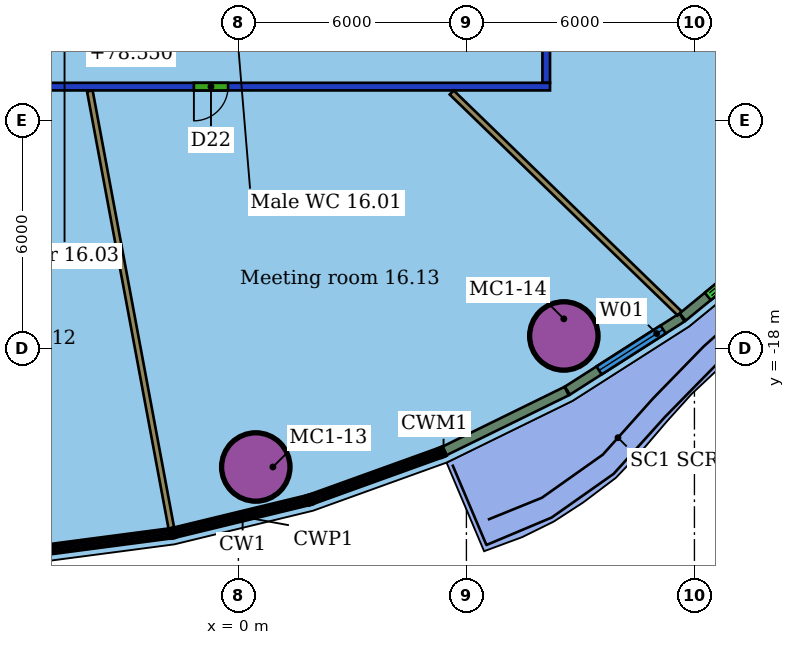
"""IFC4 building model, lengths in metres.
Left out: names, types, materials, properties, quantities, classifications, styles, units other than length and angle.
Written with IfcOpenShell. Run it as: python <this file> out.ifc"""

import sys

from ifc_helpers import new_model, si_unit, direction, frame, frame_2d, origin, origin_2d, place, context, subcontext, project, spatial, rectangle, hollow_circle, extrude, element, fill, save


model = new_model("IFC4")
c1 = context("Model", 3, precision=1e-05, world=origin(), true_north=direction((0.0, 1.0)))
c2 = subcontext(c1, "Body", "Model", "MODEL_VIEW")
j1 = project(units=[si_unit("LENGTHUNIT", "METRE"), si_unit("PLANEANGLEUNIT", "RADIAN")], contexts=[c1])
p1 = place(None, origin())
s1 = spatial("IfcSite", under=j1, at=p1, CompositionType="ELEMENT")
p2 = place(p1, origin())
s2 = spatial("IfcBuilding", under=s1, at=p2, CompositionType="ELEMENT")
p3 = place(p2, frame((0.0, 0.0, 76.7)))
s3 = spatial("IfcBuildingStorey", under=s2, at=p3, CompositionType="ELEMENT", Elevation=76.7)
for number, where, z_axis, x_axis in (
    (1, (0.458, -21.108, 0.0), (0.0, 0.0, 1.0), (1.0, 0.0, 0.0)),
    (2, (8.563, -17.66, 0.0), (0.0, 0.0, 1.0), (1.0, 0.0, 0.0)),
):
    element("IfcColumn", number, at=place(p3, frame(where, z_axis=z_axis, x_axis=x_axis)), inside=s3, PredefinedType="COLUMN", context=c2, shape_type="SweptSolid", body=[
        extrude(hollow_circle(Radius=0.9, WallThickness=0.06, at=origin_2d()), origin(), (0.0, 0.0, 1.0), 3.55),
    ])
p4 = place(p3, frame((8.2, -11.1, 0.0), z_axis=(0.0, 0.0, 1.0), x_axis=(-1.0, 0.0, 0.0)))
e3 = element("IfcWall", 3, at=p4, inside=s3, PredefinedType="PARTITIONING", context=c2, shape_type="SweptSolid", body=[
    extrude(rectangle(XDim=28.4, YDim=0.2, at=frame_2d((14.2, 0.0))), origin(), (0.0, 0.0, 1.0), 2.85),
])
p5 = place(p4, frame((24.977, 0.0, 0.0)))
e4 = element("IfcOpeningElement", 4, at=p5, cuts=e3, PredefinedType="OPENING", context=c2, shape_type="SweptSolid", body=[
    extrude(rectangle(XDim=1.1, YDim=2.1, at=frame_2d((0.55, 1.05))), frame((0.0, 0.11, 0.0), z_axis=(0.0, -1.0, 0.0), x_axis=(1.0, 0.0, 0.0)), (0.0, 0.0, 1.0), 0.22),
])
p6 = place(p4, frame((19.256, 0.0, 0.0)))
e5 = element("IfcOpeningElement", 5, at=p6, cuts=e3, PredefinedType="OPENING", context=c2, shape_type="SweptSolid", body=[
    extrude(rectangle(XDim=1.0, YDim=2.1, at=frame_2d((0.5, 1.05))), frame((0.0, 0.11, 0.0), z_axis=(0.0, -1.0, 0.0), x_axis=(1.0, 0.0, 0.0)), (0.0, 0.0, 1.0), 0.22),
])
p7 = place(p4, frame((15.081, 0.0, 0.0)))
e6 = element("IfcOpeningElement", 6, at=p7, cuts=e3, PredefinedType="OPENING", context=c2, shape_type="SweptSolid", body=[
    extrude(rectangle(XDim=0.9, YDim=2.1, at=frame_2d((0.45, 1.05))), frame((0.0, 0.11, 0.0), z_axis=(0.0, -1.0, 0.0), x_axis=(1.0, 0.0, 0.0)), (0.0, 0.0, 1.0), 0.22),
])
p8 = place(p4, frame((8.472, 0.0, 0.0)))
e7 = element("IfcOpeningElement", 7, at=p8, cuts=e3, PredefinedType="OPENING", context=c2, shape_type="SweptSolid", body=[
    extrude(rectangle(XDim=0.9, YDim=2.1, at=frame_2d((0.45, 1.05))), frame((0.0, 0.11, 0.0), z_axis=(0.0, -1.0, 0.0), x_axis=(1.0, 0.0, 0.0)), (0.0, 0.0, 1.0), 0.22),
])
p9 = place(p3, frame((8.1, 11.0, 0.0), z_axis=(0.0, 0.0, 1.0), x_axis=(0.0, -1.0, 0.0)))
e8 = element("IfcWall", 8, at=p9, inside=s3, PredefinedType="PARTITIONING", context=c2, shape_type="SweptSolid", body=[
    extrude(rectangle(XDim=22.0, YDim=0.2, at=frame_2d((11.0, 0.0))), origin(), (0.0, 0.0, 1.0), 2.85),
])
p10 = place(p9, frame((5.898, 0.0, 0.0)))
e9 = element("IfcOpeningElement", 9, at=p10, cuts=e8, PredefinedType="OPENING", context=c2, shape_type="SweptSolid", body=[
    extrude(rectangle(XDim=1.0, YDim=2.1, at=frame_2d((0.5, 1.05))), frame((0.0, 0.11, 0.0), z_axis=(0.0, -1.0, 0.0), x_axis=(1.0, 0.0, 0.0)), (0.0, 0.0, 1.0), 0.22),
])
p11 = place(p9, frame((16.7, 0.0, 0.0)))
e10 = element("IfcOpeningElement", 10, at=p11, cuts=e8, PredefinedType="OPENING", context=c2, shape_type="SweptSolid", body=[
    extrude(rectangle(XDim=1.5, YDim=2.1, at=frame_2d((0.75, 1.05))), frame((0.0, 0.11, 0.0), z_axis=(0.0, -1.0, 0.0), x_axis=(1.0, 0.0, 0.0)), (0.0, 0.0, 1.0), 0.22),
])
p12 = place(p9, frame((12.749, 0.0, 0.0)))
e11 = element("IfcOpeningElement", 11, at=p12, cuts=e8, PredefinedType="OPENING", context=c2, shape_type="SweptSolid", body=[
    extrude(rectangle(XDim=1.1, YDim=2.1, at=frame_2d((0.55, 1.05))), frame((0.0, 0.11, 0.0), z_axis=(0.0, -1.0, 0.0), x_axis=(1.0, 0.0, 0.0)), (0.0, 0.0, 1.0), 0.22),
])
p13 = place(p9, frame((9.026, 0.0, 0.0)))
e12 = element("IfcOpeningElement", 12, at=p13, cuts=e8, PredefinedType="OPENING", context=c2, shape_type="SweptSolid", body=[
    extrude(rectangle(XDim=1.5, YDim=2.1, at=frame_2d((0.75, 1.05))), frame((0.0, 0.11, 0.0), z_axis=(0.0, -1.0, 0.0), x_axis=(1.0, 0.0, 0.0)), (0.0, 0.0, 1.0), 0.22),
])
p14 = place(p3, frame((-1.763, -22.726, 0.0), z_axis=(0.0, 0.0, 1.0), x_axis=(-0.183249988058, 0.98306634663, 0.0)))
e13 = element("IfcWall", 13, at=p14, inside=s3, PredefinedType="PARTITIONING", context=c2, shape_type="SweptSolid", body=[
    extrude(rectangle(XDim=11.711, YDim=0.15, at=frame_2d((5.855, 0.0))), origin(), (0.0, 0.0, 1.0), 3.55),
])
p15 = place(p3, frame((11.609, -17.066, 0.0), z_axis=(0.0, 0.0, 1.0), x_axis=(-0.71809914042, 0.695940819702, 0.0)))
e14 = element("IfcWall", 14, at=p15, inside=s3, PredefinedType="PARTITIONING", context=c2, shape_type="SweptSolid", body=[
    extrude(rectangle(XDim=8.352, YDim=0.15, at=frame_2d((4.176, 0.0))), origin(), (0.0, 0.0, 1.0), 3.55),
])
p16 = place(p3, frame((5.41, -20.692, 0.0), z_axis=(0.0, 0.0, 1.0), x_axis=(0.897998084463, 0.439999363978, 0.0)))
e15 = element("IfcWall", 15, at=p16, inside=s3, PredefinedType="SOLIDWALL", context=c2, shape_type="SweptSolid", body=[
    extrude(rectangle(XDim=3.594, YDim=0.25, at=frame_2d((1.797, 0.0))), origin(), (0.0, 0.0, 1.0), 3.15),
])
p17 = place(p3, frame((8.657, -19.1, 0.0), z_axis=(0.0, 0.0, 1.0), x_axis=(0.842814889598, 0.538203550594, 0.0)))
e16 = element("IfcWall", 16, at=p17, inside=s3, PredefinedType="SOLIDWALL", context=c2, shape_type="SweptSolid", body=[
    extrude(rectangle(XDim=3.579, YDim=0.25, at=frame_2d((1.789, 0.0))), origin(), (0.0, 0.0, 1.0), 3.15),
])
p18 = place(p17, frame((0.989, 0.0, 0.8)))
e17 = element("IfcOpeningElement", 17, at=p18, cuts=e16, PredefinedType="OPENING", context=c2, shape_type="SweptSolid", body=[
    extrude(rectangle(XDim=2.0, YDim=2.2, at=frame_2d((1.0, 1.1))), frame((0.0, 0.135, 0.0), z_axis=(0.0, -1.0, 0.0), x_axis=(1.0, 0.0, 0.0)), (0.0, 0.0, 1.0), 0.27),
])
p19 = place(p3, frame((11.691, -17.16, 0.0), z_axis=(0.0, 0.0, 1.0), x_axis=(0.774224225452, 0.632911406694, 0.0)))
e18 = element("IfcWall", 18, at=p19, inside=s3, PredefinedType="SOLIDWALL", context=c2, shape_type="SweptSolid", body=[
    extrude(rectangle(XDim=3.504, YDim=0.25, at=frame_2d((1.752, 0.0))), origin(), (0.0, 0.0, 1.0), 3.15),
])
p20 = place(p19, frame((0.852, 0.0, 0.0)))
e19 = element("IfcOpeningElement", 19, at=p20, cuts=e18, PredefinedType="OPENING", context=c2, shape_type="SweptSolid", body=[
    extrude(rectangle(XDim=1.8, YDim=2.4, at=frame_2d((0.9, 1.2))), frame((0.0, 0.135, 0.0), z_axis=(0.0, -1.0, 0.0), x_axis=(1.0, 0.0, 0.0)), (0.0, 0.0, 1.0), 0.27),
])
p21 = place(p8, origin())
e20 = element("IfcDoor", 20, at=p21, inside=s3, OperationType="SINGLE_SWING_RIGHT", PredefinedType="DOOR", context=c2, shape_type="SweptSolid", body=[
    extrude(rectangle(XDim=0.9, YDim=2.1, at=frame_2d((0.45, 1.05))), frame((0.0, 0.025, 0.0), z_axis=(0.0, -1.0, 0.0), x_axis=(1.0, 0.0, 0.0)), (0.0, 0.0, 1.0), 0.05),
])
fill(e7, e20)
p22 = place(p18, origin())
e21 = element("IfcWindow", 21, at=p22, inside=s3, PartitioningType="SINGLE_PANEL", PredefinedType="WINDOW", context=c2, shape_type="SweptSolid", body=[
    extrude(rectangle(XDim=2.0, YDim=2.2, at=frame_2d((1.0, 1.1))), frame((0.0, 0.03, 0.0), z_axis=(0.0, -1.0, 0.0), x_axis=(1.0, 0.0, 0.0)), (0.0, 0.0, 1.0), 0.06),
])
fill(e17, e21)
p23 = place(p20, origin())
e22 = element("IfcDoor", 22, at=p23, inside=s3, OperationType="DOUBLE_DOOR_SLIDING", PredefinedType="DOOR", context=c2, shape_type="SweptSolid", body=[
    extrude(rectangle(XDim=1.8, YDim=2.4, at=frame_2d((0.9, 1.2))), frame((0.0, 0.025, 0.0), z_axis=(0.0, -1.0, 0.0), x_axis=(1.0, 0.0, 0.0)), (0.0, 0.0, 1.0), 0.05),
])
fill(e19, e22)
save(model, sys.argv[1])
